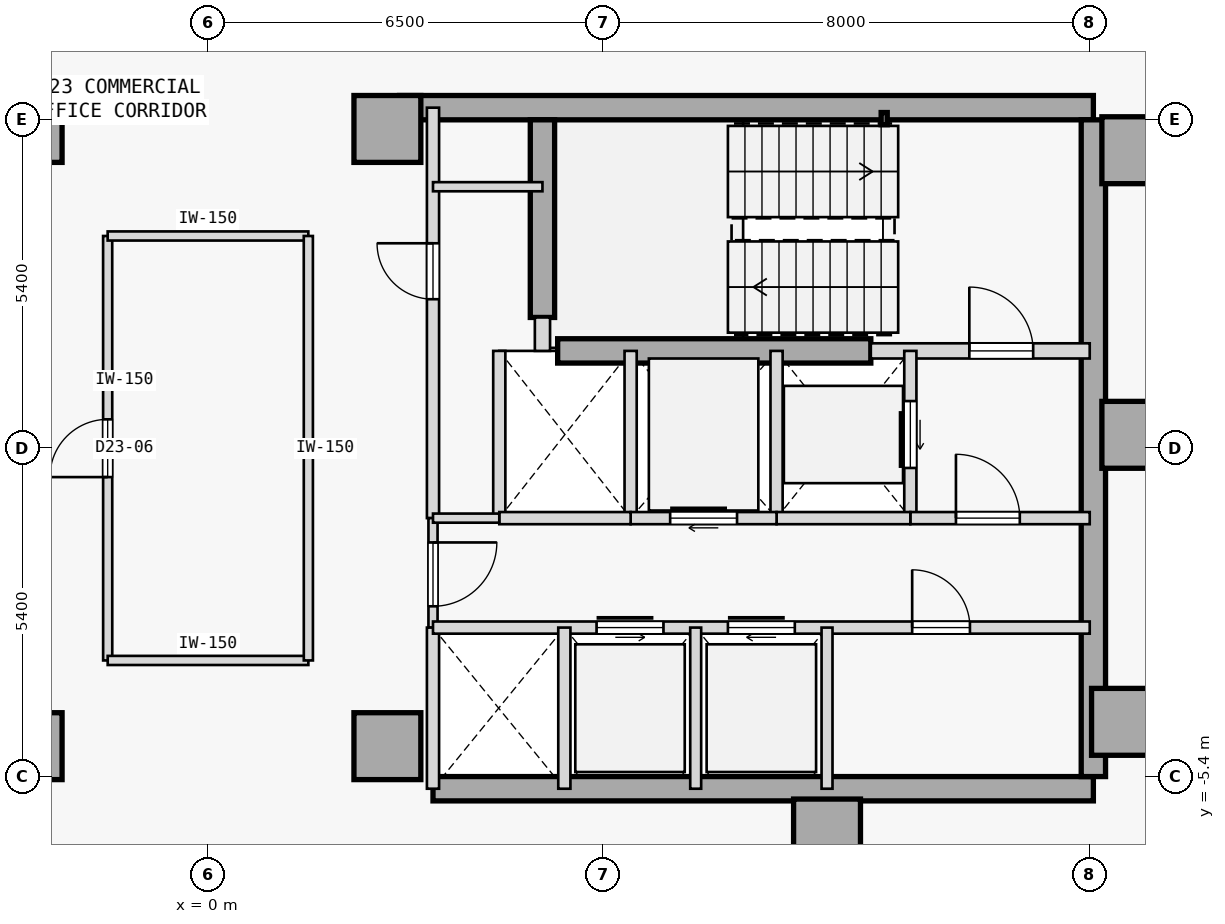
"""IFC4 building model, lengths in metres.
Left out: names, types, materials, properties, quantities, classifications, styles, units other than length and angle.
Written with IfcOpenShell. Run it as: python <this file> out.ifc"""

import sys

from ifc_helpers import new_model, si_unit, direction, frame, frame_2d, origin, origin_2d, place, context, subcontext, project, spatial, rectangle, hollow_rectangle, extrude, element, fill, save


model = new_model("IFC4")
c1 = context("Model", 3, precision=1e-05, world=origin(), true_north=direction((0.0, 1.0)))
c2 = subcontext(c1, "Body", "Model", "MODEL_VIEW")
j1 = project(units=[si_unit("LENGTHUNIT", "METRE"), si_unit("PLANEANGLEUNIT", "RADIAN")], contexts=[c1])
p1 = place(None, origin())
s1 = spatial("IfcSite", under=j1, at=p1, CompositionType="ELEMENT")
p2 = place(p1, origin())
s2 = spatial("IfcBuilding", under=s1, at=p2, CompositionType="ELEMENT")
p3 = place(p2, frame((0.0, 0.0, 94.8)))
s3 = spatial("IfcBuildingStorey", under=s2, at=p3, CompositionType="ELEMENT", Elevation=94.8)
for number, where, z_axis, x_axis in (
    (1, (-2.95, -4.9, 0.0), (0.0, 0.0, 1.0), (1.0, 0.0, 0.0)),
    (2, (-2.95, 5.25, 0.0), (0.0, 0.0, 1.0), (1.0, 0.0, 0.0)),
    (3, (15.25, 4.9, 0.0), (0.0, 0.0, 1.0), (1.0, 0.0, 0.0)),
    (4, (15.25, 0.22, 0.0), (0.0, 0.0, 1.0), (1.0, 0.0, 0.0)),
    (5, (15.08, -4.5, 0.0), (0.0, 0.0, 1.0), (1.0, 0.0, 0.0)),
    (6, (10.18, -6.32, 0.0), (0.0, 0.0, 1.0), (1.0, 0.0, 0.0)),
    (7, (2.95, -4.9, 0.0), (0.0, 0.0, 1.0), (1.0, 0.0, 0.0)),
    (8, (2.95, 5.25, 0.0), (0.0, 0.0, 1.0), (1.0, 0.0, 0.0)),
):
    element("IfcColumn", number, at=place(p3, frame(where, z_axis=z_axis, x_axis=x_axis)), inside=s3, PredefinedType="COLUMN", context=c2, shape_type="SweptSolid", body=[
        extrude(rectangle(XDim=1.1, YDim=1.1, at=origin_2d()), origin(), (0.0, 0.0, 1.0), 3.7),
    ])
p4 = place(p3, frame((3.15, 5.6, 0.0), z_axis=(0.0, 0.0, 1.0), x_axis=(1.0, 0.0, 0.0)))
e9 = element("IfcWall", 9, at=p4, inside=s3, PredefinedType="SHEAR", context=c2, shape_type="SweptSolid", body=[
    extrude(rectangle(XDim=11.41, YDim=0.4, at=frame_2d((5.705, 0.0))), origin(), (0.0, 0.0, 1.0), 3.475),
])
p5 = place(p3, frame((3.7, -5.6, 0.0), z_axis=(0.0, 0.0, 1.0), x_axis=(1.0, 0.0, 0.0)))
e10 = element("IfcWall", 10, at=p5, inside=s3, PredefinedType="SHEAR", context=c2, shape_type="SweptSolid", body=[
    extrude(rectangle(XDim=10.86, YDim=0.4, at=frame_2d((5.43, 0.0))), origin(), (0.0, 0.0, 1.0), 3.475),
])
p6 = place(p3, frame((14.56, -5.4, 0.0), z_axis=(0.0, 0.0, 1.0), x_axis=(0.0, 1.0, 0.0)))
e11 = element("IfcWall", 11, at=p6, inside=s3, PredefinedType="SHEAR", context=c2, shape_type="SweptSolid", body=[
    extrude(rectangle(XDim=10.8, YDim=0.4, at=frame_2d((5.4, 0.0))), origin(), (0.0, 0.0, 1.0), 3.475),
])
p7 = place(p3, frame((5.5, 2.15, 0.0), z_axis=(0.0, 0.0, 1.0), x_axis=(0.0, 1.0, 0.0)))
e12 = element("IfcWall", 12, at=p7, inside=s3, PredefinedType="SHEAR", context=c2, shape_type="SweptSolid", body=[
    extrude(rectangle(XDim=3.25, YDim=0.4, at=frame_2d((1.625, 0.0))), origin(), (0.0, 0.0, 1.0), 3.475),
])
p8 = place(p3, frame((5.75, 1.6, 0.0), z_axis=(0.0, 0.0, 1.0), x_axis=(1.0, 0.0, 0.0)))
e13 = element("IfcWall", 13, at=p8, inside=s3, PredefinedType="SHEAR", context=c2, shape_type="SweptSolid", body=[
    extrude(rectangle(XDim=5.15, YDim=0.4, at=frame_2d((2.575, 0.0))), origin(), (0.0, 0.0, 1.0), 3.475),
])
p9 = place(p3, frame((11.12, 5.42, 0.0), z_axis=(0.0, 0.0, 1.0), x_axis=(1.0, 0.0, 0.0)))
e14 = element("IfcColumn", 14, at=p9, inside=s3, PredefinedType="COLUMN", context=c2, shape_type="SweptSolid", body=[
    extrude(hollow_rectangle(XDim=0.1, YDim=0.2, WallThickness=0.008, at=origin_2d()), origin(), (0.0, 0.0, 1.0), 3.7),
])
p10 = place(p3, frame((10.9, 1.6, 0.0), z_axis=(0.0, 0.0, 1.0), x_axis=(1.0, 0.0, 0.0)))
e15 = element("IfcWall", 15, at=p10, inside=s3, PredefinedType="STANDARD", context=c2, shape_type="SweptSolid", body=[
    extrude(rectangle(XDim=3.6, YDim=0.25, at=frame_2d((1.8, 0.0))), origin(), (0.0, 0.0, 1.0), 3.475),
])
p11 = place(p10, frame((1.62, 0.0, 0.0)))
e16 = element("IfcOpeningElement", 16, at=p11, cuts=e15, PredefinedType="OPENING", context=c2, shape_type="SweptSolid", body=[
    extrude(rectangle(XDim=1.05, YDim=2.15, at=frame_2d((0.525, 1.075))), frame((0.0, 0.135, 0.0), z_axis=(0.0, -1.0, 0.0), x_axis=(1.0, 0.0, 0.0)), (0.0, 0.0, 1.0), 0.27),
])
p12 = place(p3, frame((5.5, 1.6, 0.0), z_axis=(0.0, 0.0, 1.0), x_axis=(0.0, 1.0, 0.0)))
e17 = element("IfcWall", 17, at=p12, inside=s3, PredefinedType="STANDARD", context=c2, shape_type="SweptSolid", body=[
    extrude(rectangle(XDim=0.55, YDim=0.25, at=frame_2d((0.275, 0.0))), origin(), (0.0, 0.0, 1.0), 3.475),
])
p13 = place(p3, frame((3.7, -1.15, 0.0), z_axis=(0.0, 0.0, 1.0), x_axis=(0.0, 1.0, 0.0)))
e18 = element("IfcWall", 18, at=p13, inside=s3, PredefinedType="STANDARD", context=c2, shape_type="SweptSolid", body=[
    extrude(rectangle(XDim=6.75, YDim=0.2, at=frame_2d((3.375, 0.0))), origin(), (0.0, 0.0, 1.0), 3.475),
])
p14 = place(p13, frame((3.6, 0.0, 0.0)))
e19 = element("IfcOpeningElement", 19, at=p14, cuts=e18, PredefinedType="OPENING", context=c2, shape_type="SweptSolid", body=[
    extrude(rectangle(XDim=0.92, YDim=2.15, at=frame_2d((0.46, 1.075))), frame((0.0, 0.11, 0.0), z_axis=(0.0, -1.0, 0.0), x_axis=(1.0, 0.0, 0.0)), (0.0, 0.0, 1.0), 0.22),
])
p15 = place(p3, frame((3.7, -2.95, 0.0), z_axis=(0.0, 0.0, 1.0), x_axis=(0.0, 1.0, 0.0)))
e20 = element("IfcWall", 20, at=p15, inside=s3, PredefinedType="PARTITIONING", context=c2, shape_type="SweptSolid", body=[
    extrude(rectangle(XDim=1.8, YDim=0.15, at=frame_2d((0.9, 0.0))), origin(), (0.0, 0.0, 1.0), 3.475),
])
p16 = place(p15, frame((0.35, 0.0, 0.0)))
e21 = element("IfcOpeningElement", 21, at=p16, cuts=e20, PredefinedType="OPENING", context=c2, shape_type="SweptSolid", body=[
    extrude(rectangle(XDim=1.05, YDim=2.18, at=frame_2d((0.525, 1.09))), frame((0.0, 0.085, 0.0), z_axis=(0.0, -1.0, 0.0), x_axis=(1.0, 0.0, 0.0)), (0.0, 0.0, 1.0), 0.17),
])
p17 = place(p3, frame((3.7, -5.6, 0.0), z_axis=(0.0, 0.0, 1.0), x_axis=(0.0, 1.0, 0.0)))
e22 = element("IfcWall", 22, at=p17, inside=s3, PredefinedType="STANDARD", context=c2, shape_type="SweptSolid", body=[
    extrude(rectangle(XDim=2.65, YDim=0.2, at=frame_2d((1.325, 0.0))), origin(), (0.0, 0.0, 1.0), 3.475),
])
p18 = place(p3, frame((11.55, -1.15, 0.0), z_axis=(0.0, 0.0, 1.0), x_axis=(0.0, 1.0, 0.0)))
e23 = element("IfcWall", 23, at=p18, inside=s3, PredefinedType="STANDARD", context=c2, shape_type="SweptSolid", body=[
    extrude(rectangle(XDim=2.75, YDim=0.2, at=frame_2d((1.375, 0.0))), origin(), (0.0, 0.0, 1.0), 3.475),
])
p19 = place(p18, frame((0.825, 0.0, 0.0)))
e24 = element("IfcOpeningElement", 24, at=p19, cuts=e23, PredefinedType="OPENING", context=c2, shape_type="SweptSolid", body=[
    extrude(rectangle(XDim=1.1, YDim=2.15, at=frame_2d((0.55, 1.075))), frame((0.0, 0.11, 0.0), z_axis=(0.0, -1.0, 0.0), x_axis=(1.0, 0.0, 0.0)), (0.0, 0.0, 1.0), 0.22),
])
p20 = place(p3, frame((9.35, -1.15, 0.0), z_axis=(0.0, 0.0, 1.0), x_axis=(0.0, 1.0, 0.0)))
e25 = element("IfcWall", 25, at=p20, inside=s3, PredefinedType="STANDARD", context=c2, shape_type="SweptSolid", body=[
    extrude(rectangle(XDim=2.75, YDim=0.2, at=frame_2d((1.375, 0.0))), origin(), (0.0, 0.0, 1.0), 3.475),
])
p21 = place(p3, frame((11.55, -1.15, 0.0), z_axis=(0.0, 0.0, 1.0), x_axis=(1.0, 0.0, 0.0)))
e26 = element("IfcWall", 26, at=p21, inside=s3, PredefinedType="STANDARD", context=c2, shape_type="SweptSolid", body=[
    extrude(rectangle(XDim=2.95, YDim=0.2, at=frame_2d((1.475, 0.0))), origin(), (0.0, 0.0, 1.0), 3.475),
])
p22 = place(p21, frame((0.75, 0.0, 0.0)))
e27 = element("IfcOpeningElement", 27, at=p22, cuts=e26, PredefinedType="OPENING", context=c2, shape_type="SweptSolid", body=[
    extrude(rectangle(XDim=1.05, YDim=2.18, at=frame_2d((0.525, 1.09))), frame((0.0, 0.11, 0.0), z_axis=(0.0, -1.0, 0.0), x_axis=(1.0, 0.0, 0.0)), (0.0, 0.0, 1.0), 0.22),
])
p23 = place(p3, frame((9.35, -1.15, 0.0), z_axis=(0.0, 0.0, 1.0), x_axis=(1.0, 0.0, 0.0)))
e28 = element("IfcWall", 28, at=p23, inside=s3, PredefinedType="STANDARD", context=c2, shape_type="SweptSolid", body=[
    extrude(rectangle(XDim=2.2, YDim=0.2, at=frame_2d((1.1, 0.0))), origin(), (0.0, 0.0, 1.0), 3.475),
])
p24 = place(p3, frame((6.95, -1.15, 0.0), z_axis=(0.0, 0.0, 1.0), x_axis=(0.0, 1.0, 0.0)))
e29 = element("IfcWall", 29, at=p24, inside=s3, PredefinedType="STANDARD", context=c2, shape_type="SweptSolid", body=[
    extrude(rectangle(XDim=2.75, YDim=0.2, at=frame_2d((1.375, 0.0))), origin(), (0.0, 0.0, 1.0), 3.475),
])
p25 = place(p3, frame((6.95, -1.15, 0.0), z_axis=(0.0, 0.0, 1.0), x_axis=(1.0, 0.0, 0.0)))
e30 = element("IfcWall", 30, at=p25, inside=s3, PredefinedType="STANDARD", context=c2, shape_type="SweptSolid", body=[
    extrude(rectangle(XDim=2.4, YDim=0.2, at=frame_2d((1.2, 0.0))), origin(), (0.0, 0.0, 1.0), 3.475),
])
p26 = place(p25, frame((0.65, 0.0, 0.0)))
e31 = element("IfcOpeningElement", 31, at=p26, cuts=e30, PredefinedType="OPENING", context=c2, shape_type="SweptSolid", body=[
    extrude(rectangle(XDim=1.1, YDim=2.15, at=frame_2d((0.55, 1.075))), frame((0.0, 0.11, 0.0), z_axis=(0.0, -1.0, 0.0), x_axis=(1.0, 0.0, 0.0)), (0.0, 0.0, 1.0), 0.22),
])
p27 = place(p3, frame((4.79, -1.15, 0.0), z_axis=(0.0, 0.0, 1.0), x_axis=(0.0, 1.0, 0.0)))
e32 = element("IfcWall", 32, at=p27, inside=s3, PredefinedType="STANDARD", context=c2, shape_type="SweptSolid", body=[
    extrude(rectangle(XDim=2.75, YDim=0.2, at=frame_2d((1.375, 0.0))), origin(), (0.0, 0.0, 1.0), 3.475),
])
p28 = place(p3, frame((4.79, -1.15, 0.0), z_axis=(0.0, 0.0, 1.0), x_axis=(1.0, 0.0, 0.0)))
e33 = element("IfcWall", 33, at=p28, inside=s3, PredefinedType="STANDARD", context=c2, shape_type="SweptSolid", body=[
    extrude(rectangle(XDim=2.16, YDim=0.2, at=frame_2d((1.08, 0.0))), origin(), (0.0, 0.0, 1.0), 3.475),
])
p29 = place(p3, frame((3.7, -1.15, 0.0), z_axis=(0.0, 0.0, 1.0), x_axis=(1.0, 0.0, 0.0)))
e34 = element("IfcWall", 34, at=p29, inside=s3, PredefinedType="PARTITIONING", context=c2, shape_type="SweptSolid", body=[
    extrude(rectangle(XDim=1.09, YDim=0.15, at=frame_2d((0.545, 0.0))), origin(), (0.0, 0.0, 1.0), 3.475),
])
p30 = place(p3, frame((3.7, -2.95, 0.0), z_axis=(0.0, 0.0, 1.0), x_axis=(1.0, 0.0, 0.0)))
e35 = element("IfcWall", 35, at=p30, inside=s3, PredefinedType="STANDARD", context=c2, shape_type="SweptSolid", body=[
    extrude(rectangle(XDim=10.8, YDim=0.2, at=frame_2d((5.4, 0.0))), origin(), (0.0, 0.0, 1.0), 3.475),
])
p31 = place(p30, frame((2.69, 0.0, 0.0)))
e36 = element("IfcOpeningElement", 36, at=p31, cuts=e35, PredefinedType="OPENING", context=c2, shape_type="SweptSolid", body=[
    extrude(rectangle(XDim=1.1, YDim=2.15, at=frame_2d((0.55, 1.075))), frame((0.0, 0.11, 0.0), z_axis=(0.0, -1.0, 0.0), x_axis=(1.0, 0.0, 0.0)), (0.0, 0.0, 1.0), 0.22),
])
p32 = place(p30, frame((4.85, 0.0, 0.0)))
e37 = element("IfcOpeningElement", 37, at=p32, cuts=e35, PredefinedType="OPENING", context=c2, shape_type="SweptSolid", body=[
    extrude(rectangle(XDim=1.1, YDim=2.15, at=frame_2d((0.55, 1.075))), frame((0.0, 0.11, 0.0), z_axis=(0.0, -1.0, 0.0), x_axis=(1.0, 0.0, 0.0)), (0.0, 0.0, 1.0), 0.22),
])
p33 = place(p30, frame((7.88, 0.0, 0.0)))
e38 = element("IfcOpeningElement", 38, at=p33, cuts=e35, PredefinedType="OPENING", context=c2, shape_type="SweptSolid", body=[
    extrude(rectangle(XDim=0.95, YDim=2.15, at=frame_2d((0.475, 1.075))), frame((0.0, 0.11, 0.0), z_axis=(0.0, -1.0, 0.0), x_axis=(1.0, 0.0, 0.0)), (0.0, 0.0, 1.0), 0.22),
])
p34 = place(p3, frame((5.86, -5.6, 0.0), z_axis=(0.0, 0.0, 1.0), x_axis=(0.0, 1.0, 0.0)))
e39 = element("IfcWall", 39, at=p34, inside=s3, PredefinedType="STANDARD", context=c2, shape_type="SweptSolid", body=[
    extrude(rectangle(XDim=2.65, YDim=0.2, at=frame_2d((1.325, 0.0))), origin(), (0.0, 0.0, 1.0), 3.475),
])
for number, where, z_axis, x_axis in (
    (40, (10.18, -5.6, 0.0), (0.0, 0.0, 1.0), (0.0, 1.0, 0.0)),
    (41, (8.02, -5.6, 0.0), (0.0, 0.0, 1.0), (0.0, 1.0, 0.0)),
):
    element("IfcWall", number, at=place(p3, frame(where, z_axis=z_axis, x_axis=x_axis)), inside=s3, PredefinedType="STANDARD", context=c2, shape_type="SweptSolid", body=[
        extrude(rectangle(XDim=2.65, YDim=0.18, at=frame_2d((1.325, 0.0))), origin(), (0.0, 0.0, 1.0), 3.475),
    ])
p35 = place(p3, frame((3.7, 4.3, 0.0), z_axis=(0.0, 0.0, 1.0), x_axis=(1.0, 0.0, 0.0)))
e42 = element("IfcWall", 42, at=p35, inside=s3, PredefinedType="PARTITIONING", context=c2, shape_type="SweptSolid", body=[
    extrude(rectangle(XDim=1.8, YDim=0.15, at=frame_2d((0.9, 0.0))), origin(), (0.0, 0.0, 1.0), 3.475),
])
p36 = place(p3, frame((-1.65, -3.49, 0.0), z_axis=(0.0, 0.0, 1.0), x_axis=(-0.000104928124, 0.999999994495, 0.0)))
e43 = element("IfcWall", 43, at=p36, inside=s3, PredefinedType="PARTITIONING", context=c2, shape_type="SweptSolid", body=[
    extrude(rectangle(XDim=6.98, YDim=0.15, at=frame_2d((3.49, 0.0))), origin(), (0.0, 0.0, 1.0), 3.475),
])
p37 = place(p36, frame((3.015, 0.0, 0.0)))
e44 = element("IfcOpeningElement", 44, at=p37, cuts=e43, PredefinedType="OPENING", context=c2, shape_type="SweptSolid", body=[
    extrude(rectangle(XDim=0.95, YDim=2.15, at=frame_2d((0.475, 1.075))), frame((0.0, 0.085, 0.0), z_axis=(0.0, -1.0, 0.0), x_axis=(1.0, 0.0, 0.0)), (0.0, 0.0, 1.0), 0.17),
])
p38 = place(p3, frame((-1.65, -3.49, 0.0), z_axis=(0.0, 0.0, 1.0), x_axis=(1.0, 0.0, 0.0)))
e45 = element("IfcWall", 45, at=p38, inside=s3, PredefinedType="PARTITIONING", context=c2, shape_type="SweptSolid", body=[
    extrude(rectangle(XDim=3.3, YDim=0.15, at=frame_2d((1.65, 0.0))), origin(), (0.0, 0.0, 1.0), 3.475),
])
p39 = place(p3, frame((-1.65, 3.49, 0.0), z_axis=(0.0, 0.0, 1.0), x_axis=(1.0, 0.0, 0.0)))
e46 = element("IfcWall", 46, at=p39, inside=s3, PredefinedType="PARTITIONING", context=c2, shape_type="SweptSolid", body=[
    extrude(rectangle(XDim=3.3, YDim=0.15, at=frame_2d((1.65, 0.0))), origin(), (0.0, 0.0, 1.0), 3.475),
])
p40 = place(p3, frame((1.65, -3.49, 0.0), z_axis=(0.0, 0.0, 1.0), x_axis=(-6.9952083e-05, 0.999999997553, 0.0)))
e47 = element("IfcWall", 47, at=p40, inside=s3, PredefinedType="PARTITIONING", context=c2, shape_type="SweptSolid", body=[
    extrude(rectangle(XDim=6.98, YDim=0.15, at=frame_2d((3.49, 0.0))), origin(), (0.0, 0.0, 1.0), 3.475),
])
p41 = place(p11, origin())
e48 = element("IfcDoor", 48, at=p41, inside=s3, OperationType="SINGLE_SWING_LEFT", PredefinedType="DOOR", context=c2, shape_type="SweptSolid", body=[
    extrude(rectangle(XDim=1.05, YDim=2.15, at=frame_2d((0.525, 1.075))), frame((0.0, 0.025, 0.0), z_axis=(0.0, -1.0, 0.0), x_axis=(1.0, 0.0, 0.0)), (0.0, 0.0, 1.0), 0.05),
])
fill(e16, e48)
p42 = place(p22, origin())
e49 = element("IfcDoor", 49, at=p42, inside=s3, OperationType="SINGLE_SWING_LEFT", PredefinedType="DOOR", context=c2, shape_type="SweptSolid", body=[
    extrude(rectangle(XDim=1.05, YDim=2.18, at=frame_2d((0.525, 1.09))), frame((0.0, 0.025, 0.0), z_axis=(0.0, -1.0, 0.0), x_axis=(1.0, 0.0, 0.0)), (0.0, 0.0, 1.0), 0.05),
])
fill(e27, e49)
p43 = place(p16, frame((1.05, 0.0, 0.0), z_axis=(0.0, 0.0, 1.0), x_axis=(-1.0, 0.0, 0.0)))
e50 = element("IfcDoor", 50, at=p43, inside=s3, OperationType="SINGLE_SWING_RIGHT", PredefinedType="DOOR", context=c2, shape_type="SweptSolid", body=[
    extrude(rectangle(XDim=1.05, YDim=2.18, at=frame_2d((0.525, 1.09))), frame((0.0, 0.025, 0.0), z_axis=(0.0, -1.0, 0.0), x_axis=(1.0, 0.0, 0.0)), (0.0, 0.0, 1.0), 0.05),
])
fill(e21, e50)
p44 = place(p19, origin())
e51 = element("IfcDoor", 51, at=p44, inside=s3, OperationType="SLIDING_TO_RIGHT", PredefinedType="DOOR", context=c2, shape_type="SweptSolid", body=[
    extrude(rectangle(XDim=1.1, YDim=2.15, at=frame_2d((0.55, 1.075))), frame((0.0, 0.025, 0.0), z_axis=(0.0, -1.0, 0.0), x_axis=(1.0, 0.0, 0.0)), (0.0, 0.0, 1.0), 0.05),
])
fill(e24, e51)
p45 = place(p26, origin())
e52 = element("IfcDoor", 52, at=p45, inside=s3, OperationType="SLIDING_TO_RIGHT", PredefinedType="DOOR", context=c2, shape_type="SweptSolid", body=[
    extrude(rectangle(XDim=1.1, YDim=2.15, at=frame_2d((0.55, 1.075))), frame((0.0, 0.025, 0.0), z_axis=(0.0, -1.0, 0.0), x_axis=(1.0, 0.0, 0.0)), (0.0, 0.0, 1.0), 0.05),
])
fill(e31, e52)
p46 = place(p31, origin())
e53 = element("IfcDoor", 53, at=p46, inside=s3, OperationType="SLIDING_TO_LEFT", PredefinedType="DOOR", context=c2, shape_type="SweptSolid", body=[
    extrude(rectangle(XDim=1.1, YDim=2.15, at=frame_2d((0.55, 1.075))), frame((0.0, 0.025, 0.0), z_axis=(0.0, -1.0, 0.0), x_axis=(1.0, 0.0, 0.0)), (0.0, 0.0, 1.0), 0.05),
])
fill(e36, e53)
p47 = place(p32, origin())
e54 = element("IfcDoor", 54, at=p47, inside=s3, OperationType="SLIDING_TO_RIGHT", PredefinedType="DOOR", context=c2, shape_type="SweptSolid", body=[
    extrude(rectangle(XDim=1.1, YDim=2.15, at=frame_2d((0.55, 1.075))), frame((0.0, 0.025, 0.0), z_axis=(0.0, -1.0, 0.0), x_axis=(1.0, 0.0, 0.0)), (0.0, 0.0, 1.0), 0.05),
])
fill(e37, e54)
p48 = place(p33, origin())
e55 = element("IfcDoor", 55, at=p48, inside=s3, OperationType="SINGLE_SWING_LEFT", PredefinedType="DOOR", context=c2, shape_type="SweptSolid", body=[
    extrude(rectangle(XDim=0.95, YDim=2.15, at=frame_2d((0.475, 1.075))), frame((0.0, 0.025, 0.0), z_axis=(0.0, -1.0, 0.0), x_axis=(1.0, 0.0, 0.0)), (0.0, 0.0, 1.0), 0.05),
])
fill(e38, e55)
p49 = place(p14, origin())
e56 = element("IfcDoor", 56, at=p49, inside=s3, OperationType="SINGLE_SWING_RIGHT", PredefinedType="DOOR", context=c2, shape_type="SweptSolid", body=[
    extrude(rectangle(XDim=0.92, YDim=2.15, at=frame_2d((0.46, 1.075))), frame((0.0, 0.025, 0.0), z_axis=(0.0, -1.0, 0.0), x_axis=(1.0, 0.0, 0.0)), (0.0, 0.0, 1.0), 0.05),
])
fill(e19, e56)
p50 = place(p37, origin())
e57 = element("IfcDoor", 57, at=p50, inside=s3, OperationType="SINGLE_SWING_LEFT", PredefinedType="DOOR", context=c2, shape_type="SweptSolid", body=[
    extrude(rectangle(XDim=0.95, YDim=2.15, at=frame_2d((0.475, 1.075))), frame((0.0, 0.025, 0.0), z_axis=(0.0, -1.0, 0.0), x_axis=(1.0, 0.0, 0.0)), (0.0, 0.0, 1.0), 0.05),
])
fill(e44, e57)
save(model, sys.argv[1])
